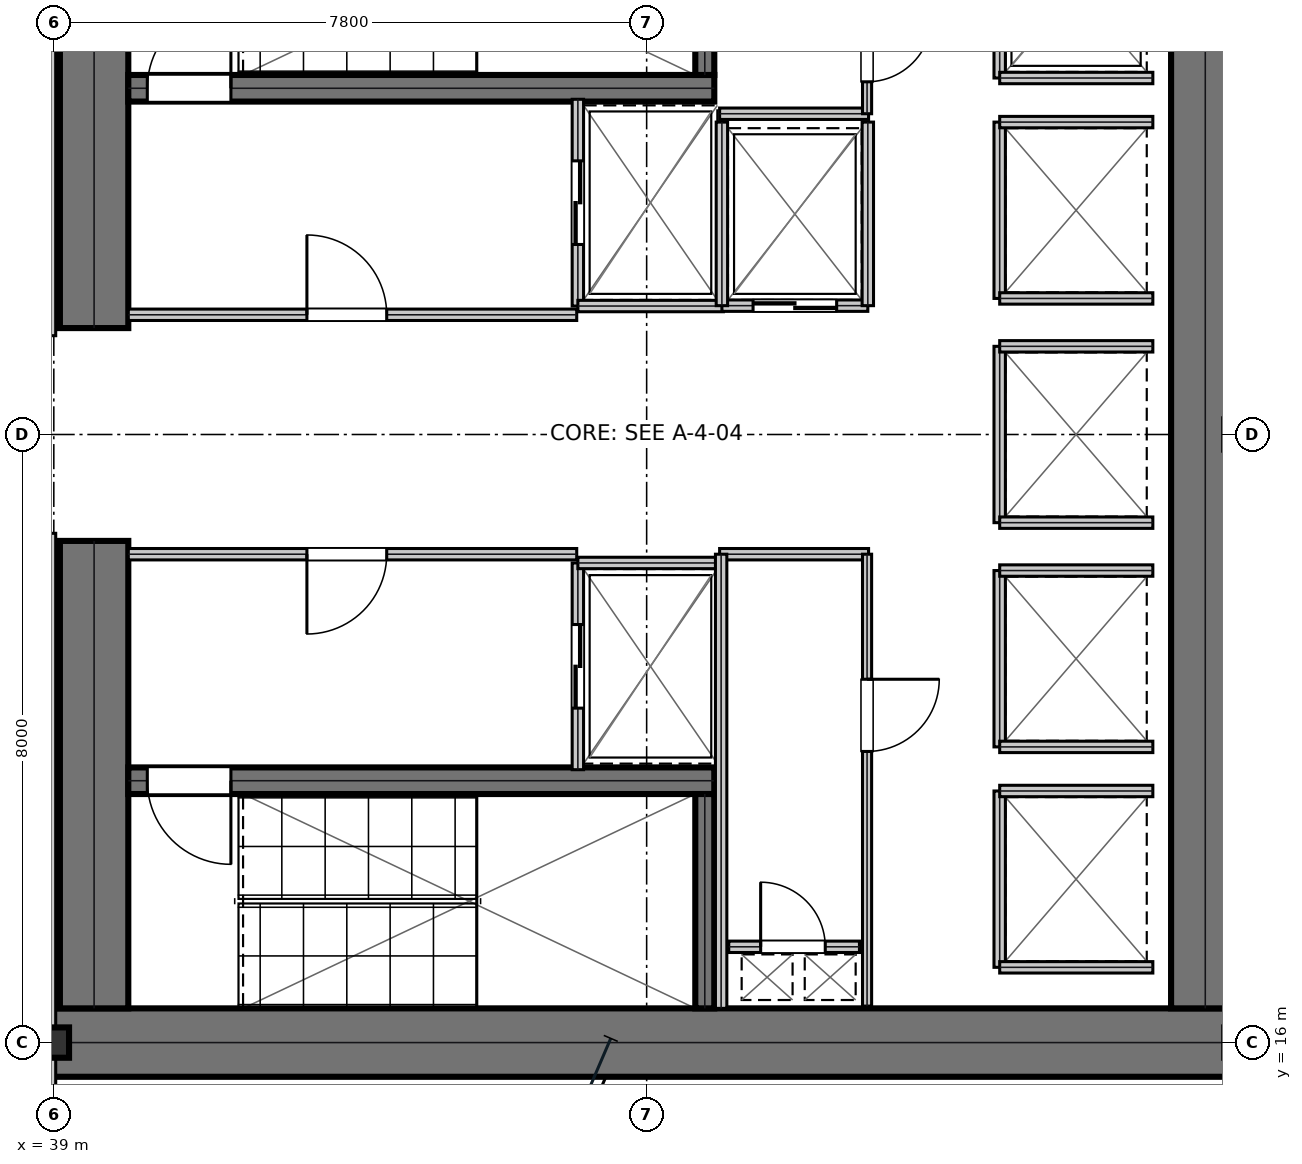
"""IFC4 building model, lengths in metres.
Left out: names, types, materials, properties, quantities, classifications, styles, units other than length and angle.
Written with IfcOpenShell. Run it as: python <this file> out.ifc"""

import sys

from ifc_helpers import new_model, si_unit, direction, frame, frame_2d, origin, origin_2d, place, context, subcontext, project, spatial, rectangle, i_section, extrude, element, fill, save


model = new_model("IFC4")
c1 = context("Model", 3, precision=1e-05, world=origin(), true_north=direction((0.0, 1.0)))
c2 = subcontext(c1, "Body", "Model", "MODEL_VIEW")
j1 = project(units=[si_unit("LENGTHUNIT", "METRE"), si_unit("PLANEANGLEUNIT", "RADIAN")], contexts=[c1])
p1 = place(None, origin())
s1 = spatial("IfcSite", under=j1, at=p1, CompositionType="ELEMENT")
p2 = place(p1, origin())
s2 = spatial("IfcBuilding", under=s1, at=p2, CompositionType="ELEMENT")
p3 = place(p2, frame((0.0, 0.0, 86.4)))
s3 = spatial("IfcBuildingStorey", under=s2, at=p3, CompositionType="ELEMENT", Elevation=86.4)
p4 = place(p3, frame((38.8, 16.0, 0.0), z_axis=(0.0, 0.0, 1.0), x_axis=(1.0, 0.0, 0.0)))
e1 = element("IfcWall", 1, at=p4, inside=s3, PredefinedType="SHEAR", context=c2, shape_type="SweptSolid", body=[
    extrude(rectangle(XDim=16.0, YDim=0.9, at=frame_2d((8.0, 0.0))), origin(), (0.0, 0.0, 1.0), 3.81),
])
for number, where, z_axis, x_axis in (
    (2, (39.53, 16.45, 0.0), (0.0, 0.0, 1.0), (0.0, 1.0, 0.0)),
    (3, (39.53, 25.4, 0.0), (0.0, 0.0, 1.0), (0.0, 1.0, 0.0)),
):
    element("IfcWall", number, at=place(p3, frame(where, z_axis=z_axis, x_axis=x_axis)), inside=s3, PredefinedType="SHEAR", context=c2, shape_type="SweptSolid", body=[
        extrude(rectangle(XDim=6.15, YDim=0.9, at=frame_2d((3.075, 0.0))), origin(), (0.0, 0.0, 1.0), 3.81),
    ])
p5 = place(p3, frame((54.15, 16.45, 0.0), z_axis=(0.0, 0.0, 1.0), x_axis=(0.0, 1.0, 0.0)))
e4 = element("IfcWall", 4, at=p5, inside=s3, PredefinedType="SHEAR", context=c2, shape_type="SweptSolid", body=[
    extrude(rectangle(XDim=15.1, YDim=0.9, at=frame_2d((7.55, 0.0))), origin(), (0.0, 0.0, 1.0), 3.81),
])
p6 = place(p3, frame((39.98, 28.555, 0.0), z_axis=(0.0, 0.0, 1.0), x_axis=(1.0, 0.0, 0.0)))
e5 = element("IfcWall", 5, at=p6, inside=s3, PredefinedType="SHEAR", context=c2, shape_type="SweptSolid", body=[
    extrude(rectangle(XDim=7.71, YDim=0.35, at=frame_2d((3.855, 0.0))), origin(), (0.0, 0.0, 1.0), 3.81),
])
p7 = place(p6, frame((0.25, 0.0, 0.0)))
e6 = element("IfcOpeningElement", 6, at=p7, cuts=e5, PredefinedType="OPENING", context=c2, shape_type="SweptSolid", body=[
    extrude(rectangle(XDim=1.1, YDim=2.15, at=frame_2d((0.55, 1.075))), frame((0.0, 0.185, 0.0), z_axis=(0.0, -1.0, 0.0), x_axis=(1.0, 0.0, 0.0)), (0.0, 0.0, 1.0), 0.37),
])
p8 = place(p3, frame((39.98, 19.445, 0.0), z_axis=(0.0, 0.0, 1.0), x_axis=(1.0, 0.0, 0.0)))
e7 = element("IfcWall", 7, at=p8, inside=s3, PredefinedType="SHEAR", context=c2, shape_type="SweptSolid", body=[
    extrude(rectangle(XDim=7.71, YDim=0.35, at=frame_2d((3.855, 0.0))), origin(), (0.0, 0.0, 1.0), 3.81),
])
p9 = place(p8, frame((0.25, 0.0, 0.0)))
e8 = element("IfcOpeningElement", 8, at=p9, cuts=e7, PredefinedType="OPENING", context=c2, shape_type="SweptSolid", body=[
    extrude(rectangle(XDim=1.1, YDim=2.15, at=frame_2d((0.55, 1.075))), frame((0.0, 0.185, 0.0), z_axis=(0.0, -1.0, 0.0), x_axis=(1.0, 0.0, 0.0)), (0.0, 0.0, 1.0), 0.37),
])
for number, where, z_axis, x_axis in (
    (9, (47.565, 28.73, 0.0), (0.0, 0.0, 1.0), (0.0, 1.0, 0.0)),
    (10, (47.565, 16.45, 0.0), (0.0, 0.0, 1.0), (0.0, 1.0, 0.0)),
):
    element("IfcWall", number, at=place(p3, frame(where, z_axis=z_axis, x_axis=x_axis)), inside=s3, PredefinedType="SHEAR", context=c2, shape_type="SweptSolid", body=[
        extrude(rectangle(XDim=2.82, YDim=0.25, at=frame_2d((1.41, 0.0))), origin(), (0.0, 0.0, 1.0), 3.81),
    ])
p10 = place(p3, frame((39.0, 16.0, 0.0), z_axis=(0.0, 0.0, 1.0), x_axis=(1.0, 0.0, 0.0)))
e11 = element("IfcColumn", 11, at=p10, inside=s3, PredefinedType="COLUMN", context=c2, shape_type="SweptSolid", body=[
    extrude(i_section(OverallWidth=0.401, OverallDepth=0.399, WebThickness=0.025, FlangeThickness=0.04, at=origin_2d()), origin(), (0.0, 0.0, 1.0), 4.044),
])
p11 = place(p3, frame((39.98, 25.575, 0.0), z_axis=(0.0, 0.0, 1.0), x_axis=(1.0, 0.0, 0.0)))
e12 = element("IfcWall", 12, at=p11, inside=s3, PredefinedType="PARTITIONING", context=c2, shape_type="SweptSolid", body=[
    extrude(rectangle(XDim=5.9, YDim=0.15, at=frame_2d((2.95, 0.0))), origin(), (0.0, 0.0, 1.0), 3.81),
])
p12 = place(p11, frame((2.35, 0.0, 0.0)))
e13 = element("IfcOpeningElement", 13, at=p12, cuts=e12, PredefinedType="OPENING", context=c2, shape_type="SweptSolid", body=[
    extrude(rectangle(XDim=1.05, YDim=2.15, at=frame_2d((0.525, 1.075))), frame((0.0, 0.085, 0.0), z_axis=(0.0, -1.0, 0.0), x_axis=(1.0, 0.0, 0.0)), (0.0, 0.0, 1.0), 0.17),
])
p13 = place(p3, frame((39.98, 22.425, 0.0), z_axis=(0.0, 0.0, 1.0), x_axis=(1.0, 0.0, 0.0)))
e14 = element("IfcWall", 14, at=p13, inside=s3, PredefinedType="PARTITIONING", context=c2, shape_type="SweptSolid", body=[
    extrude(rectangle(XDim=5.9, YDim=0.15, at=frame_2d((2.95, 0.0))), origin(), (0.0, 0.0, 1.0), 3.81),
])
p14 = place(p13, frame((2.35, 0.0, 0.0)))
e15 = element("IfcOpeningElement", 15, at=p14, cuts=e14, PredefinedType="OPENING", context=c2, shape_type="SweptSolid", body=[
    extrude(rectangle(XDim=1.05, YDim=2.15, at=frame_2d((0.525, 1.075))), frame((0.0, 0.085, 0.0), z_axis=(0.0, -1.0, 0.0), x_axis=(1.0, 0.0, 0.0)), (0.0, 0.0, 1.0), 0.17),
])
p15 = place(p3, frame((45.895, 25.69, 0.0), z_axis=(0.0, 0.0, 1.0), x_axis=(0.0, 1.0, 0.0)))
e16 = element("IfcWall", 16, at=p15, inside=s3, PredefinedType="PARTITIONING", context=c2, shape_type="SweptSolid", body=[
    extrude(rectangle(XDim=2.72, YDim=0.15, at=frame_2d((1.36, 0.0))), origin(), (0.0, 0.0, 1.0), 3.81),
])
p16 = place(p15, frame((0.81, 0.0, 0.0)))
e17 = element("IfcOpeningElement", 17, at=p16, cuts=e16, PredefinedType="OPENING", context=c2, shape_type="SweptSolid", body=[
    extrude(rectangle(XDim=1.1, YDim=2.15, at=frame_2d((0.55, 1.075))), frame((0.0, 0.085, 0.0), z_axis=(0.0, -1.0, 0.0), x_axis=(1.0, 0.0, 0.0)), (0.0, 0.0, 1.0), 0.17),
])
p17 = place(p3, frame((45.895, 25.69, 0.0), z_axis=(0.0, 0.0, 1.0), x_axis=(1.0, 0.0, 0.0)))
e18 = element("IfcWall", 18, at=p17, inside=s3, PredefinedType="PARTITIONING", context=c2, shape_type="SweptSolid", body=[
    extrude(rectangle(XDim=1.915, YDim=0.15, at=frame_2d((0.958, 0.0))), origin(), (0.0, 0.0, 1.0), 3.81),
])
p18 = place(p3, frame((45.895, 19.59, 0.0), z_axis=(0.0, 0.0, 1.0), x_axis=(0.0, 1.0, 0.0)))
e19 = element("IfcWall", 19, at=p18, inside=s3, PredefinedType="PARTITIONING", context=c2, shape_type="SweptSolid", body=[
    extrude(rectangle(XDim=2.72, YDim=0.15, at=frame_2d((1.36, 0.0))), origin(), (0.0, 0.0, 1.0), 3.81),
])
p19 = place(p18, frame((0.81, 0.0, 0.0)))
e20 = element("IfcOpeningElement", 20, at=p19, cuts=e19, PredefinedType="OPENING", context=c2, shape_type="SweptSolid", body=[
    extrude(rectangle(XDim=1.1, YDim=2.15, at=frame_2d((0.55, 1.075))), frame((0.0, 0.085, 0.0), z_axis=(0.0, -1.0, 0.0), x_axis=(1.0, 0.0, 0.0)), (0.0, 0.0, 1.0), 0.17),
])
p20 = place(p3, frame((45.895, 22.31, 0.0), z_axis=(0.0, 0.0, 1.0), x_axis=(1.0, 0.0, 0.0)))
e21 = element("IfcWall", 21, at=p20, inside=s3, PredefinedType="PARTITIONING", context=c2, shape_type="SweptSolid", body=[
    extrude(rectangle(XDim=1.915, YDim=0.15, at=frame_2d((0.958, 0.0))), origin(), (0.0, 0.0, 1.0), 3.81),
])
p21 = place(p3, frame((47.79, 25.695, 0.0), z_axis=(0.0, 0.0, 1.0), x_axis=(1.0, 0.0, 0.0)))
e22 = element("IfcWall", 22, at=p21, inside=s3, PredefinedType="PARTITIONING", context=c2, shape_type="SweptSolid", body=[
    extrude(rectangle(XDim=1.92, YDim=0.15, at=frame_2d((0.96, 0.0))), origin(), (0.0, 0.0, 1.0), 3.81),
])
p22 = place(p21, frame((0.41, 0.0, 0.0)))
e23 = element("IfcOpeningElement", 23, at=p22, cuts=e22, PredefinedType="OPENING", context=c2, shape_type="SweptSolid", body=[
    extrude(rectangle(XDim=1.1, YDim=2.15, at=frame_2d((0.55, 1.075))), frame((0.0, 0.085, 0.0), z_axis=(0.0, -1.0, 0.0), x_axis=(1.0, 0.0, 0.0)), (0.0, 0.0, 1.0), 0.17),
])
for number, where, z_axis, x_axis in (
    (24, (47.79, 25.695, 0.0), (0.0, 0.0, 1.0), (0.0, 1.0, 0.0)),
    (25, (49.71, 25.695, 0.0), (0.0, 0.0, 1.0), (0.0, 1.0, 0.0)),
):
    element("IfcWall", number, at=place(p3, frame(where, z_axis=z_axis, x_axis=x_axis)), inside=s3, PredefinedType="PARTITIONING", context=c2, shape_type="SweptSolid", body=[
        extrude(rectangle(XDim=2.415, YDim=0.15, at=frame_2d((1.208, 0.0))), origin(), (0.0, 0.0, 1.0), 3.81),
    ])
p23 = place(p3, frame((51.445, 28.69, 0.0), z_axis=(0.0, 0.0, 1.0), x_axis=(0.0, 1.0, 0.0)))
e26 = element("IfcWall", 26, at=p23, inside=s3, PredefinedType="PARTITIONING", context=c2, shape_type="SweptSolid", body=[
    extrude(rectangle(XDim=2.32, YDim=0.15, at=frame_2d((1.16, 0.0))), origin(), (0.0, 0.0, 1.0), 3.81),
])
p24 = place(p23, frame((0.61, 0.0, 0.0)))
e27 = element("IfcOpeningElement", 27, at=p24, cuts=e26, PredefinedType="OPENING", context=c2, shape_type="SweptSolid", body=[
    extrude(rectangle(XDim=1.1, YDim=2.15, at=frame_2d((0.55, 1.075))), frame((0.0, 0.085, 0.0), z_axis=(0.0, -1.0, 0.0), x_axis=(1.0, 0.0, 0.0)), (0.0, 0.0, 1.0), 0.17),
])
p25 = place(p3, frame((51.445, 28.69, 0.0), z_axis=(0.0, 0.0, 1.0), x_axis=(1.0, 0.0, 0.0)))
e28 = element("IfcWall", 28, at=p25, inside=s3, PredefinedType="PARTITIONING", context=c2, shape_type="SweptSolid", body=[
    extrude(rectangle(XDim=2.015, YDim=0.15, at=frame_2d((1.007, 0.0))), origin(), (0.0, 0.0, 1.0), 3.81),
])
p26 = place(p3, frame((51.445, 25.79, 0.0), z_axis=(0.0, 0.0, 1.0), x_axis=(0.0, 1.0, 0.0)))
e29 = element("IfcWall", 29, at=p26, inside=s3, PredefinedType="PARTITIONING", context=c2, shape_type="SweptSolid", body=[
    extrude(rectangle(XDim=2.32, YDim=0.15, at=frame_2d((1.16, 0.0))), origin(), (0.0, 0.0, 1.0), 3.81),
])
for number, where, z_axis, x_axis in (
    (30, (51.445, 25.79, 0.0), (0.0, 0.0, 1.0), (1.0, 0.0, 0.0)),
    (31, (51.445, 28.11, 0.0), (0.0, 0.0, 1.0), (1.0, 0.0, 0.0)),
):
    element("IfcWall", number, at=place(p3, frame(where, z_axis=z_axis, x_axis=x_axis)), inside=s3, PredefinedType="PARTITIONING", context=c2, shape_type="SweptSolid", body=[
        extrude(rectangle(XDim=2.015, YDim=0.15, at=frame_2d((1.007, 0.0))), origin(), (0.0, 0.0, 1.0), 3.81),
    ])
p27 = place(p3, frame((51.445, 19.89, 0.0), z_axis=(0.0, 0.0, 1.0), x_axis=(0.0, 1.0, 0.0)))
e32 = element("IfcWall", 32, at=p27, inside=s3, PredefinedType="PARTITIONING", context=c2, shape_type="SweptSolid", body=[
    extrude(rectangle(XDim=2.32, YDim=0.15, at=frame_2d((1.16, 0.0))), origin(), (0.0, 0.0, 1.0), 3.81),
])
for number, where, z_axis, x_axis in (
    (33, (51.445, 19.89, 0.0), (0.0, 0.0, 1.0), (1.0, 0.0, 0.0)),
    (34, (51.445, 22.21, 0.0), (0.0, 0.0, 1.0), (1.0, 0.0, 0.0)),
):
    element("IfcWall", number, at=place(p3, frame(where, z_axis=z_axis, x_axis=x_axis)), inside=s3, PredefinedType="PARTITIONING", context=c2, shape_type="SweptSolid", body=[
        extrude(rectangle(XDim=2.015, YDim=0.15, at=frame_2d((1.007, 0.0))), origin(), (0.0, 0.0, 1.0), 3.81),
    ])
p28 = place(p3, frame((51.445, 22.84, 0.0), z_axis=(0.0, 0.0, 1.0), x_axis=(0.0, 1.0, 0.0)))
e35 = element("IfcWall", 35, at=p28, inside=s3, PredefinedType="PARTITIONING", context=c2, shape_type="SweptSolid", body=[
    extrude(rectangle(XDim=2.32, YDim=0.15, at=frame_2d((1.16, 0.0))), origin(), (0.0, 0.0, 1.0), 3.81),
])
for number, where, z_axis, x_axis in (
    (36, (51.445, 22.84, 0.0), (0.0, 0.0, 1.0), (1.0, 0.0, 0.0)),
    (37, (51.445, 25.16, 0.0), (0.0, 0.0, 1.0), (1.0, 0.0, 0.0)),
):
    element("IfcWall", number, at=place(p3, frame(where, z_axis=z_axis, x_axis=x_axis)), inside=s3, PredefinedType="PARTITIONING", context=c2, shape_type="SweptSolid", body=[
        extrude(rectangle(XDim=2.015, YDim=0.15, at=frame_2d((1.007, 0.0))), origin(), (0.0, 0.0, 1.0), 3.81),
    ])
p29 = place(p3, frame((51.445, 16.99, 0.0), z_axis=(0.0, 0.0, 1.0), x_axis=(0.0, 1.0, 0.0)))
e38 = element("IfcWall", 38, at=p29, inside=s3, PredefinedType="PARTITIONING", context=c2, shape_type="SweptSolid", body=[
    extrude(rectangle(XDim=2.32, YDim=0.15, at=frame_2d((1.16, 0.0))), origin(), (0.0, 0.0, 1.0), 3.81),
])
for number, where, z_axis, x_axis in (
    (39, (51.445, 16.99, 0.0), (0.0, 0.0, 1.0), (1.0, 0.0, 0.0)),
    (40, (51.445, 19.31, 0.0), (0.0, 0.0, 1.0), (1.0, 0.0, 0.0)),
):
    element("IfcWall", number, at=place(p3, frame(where, z_axis=z_axis, x_axis=x_axis)), inside=s3, PredefinedType="PARTITIONING", context=c2, shape_type="SweptSolid", body=[
        extrude(rectangle(XDim=2.015, YDim=0.15, at=frame_2d((1.007, 0.0))), origin(), (0.0, 0.0, 1.0), 3.81),
    ])
p30 = place(p3, frame((47.88, 17.26, 0.0), z_axis=(0.0, 0.0, 1.0), x_axis=(1.0, 0.0, 0.0)))
e41 = element("IfcWall", 41, at=p30, inside=s3, PredefinedType="PARTITIONING", context=c2, shape_type="SweptSolid", body=[
    extrude(rectangle(XDim=1.72, YDim=0.15, at=frame_2d((0.86, 0.0))), origin(), (0.0, 0.0, 1.0), 3.81),
])
p31 = place(p30, frame((0.42, 0.0, 0.0)))
e42 = element("IfcOpeningElement", 42, at=p31, cuts=e41, PredefinedType="OPENING", context=c2, shape_type="SweptSolid", body=[
    extrude(rectangle(XDim=0.85, YDim=2.15, at=frame_2d((0.425, 1.075))), frame((0.0, 0.085, 0.0), z_axis=(0.0, -1.0, 0.0), x_axis=(1.0, 0.0, 0.0)), (0.0, 0.0, 1.0), 0.17),
])
p32 = place(p3, frame((47.76, 22.425, 0.0), z_axis=(0.0, 0.0, 1.0), x_axis=(1.0, 0.0, 0.0)))
e43 = element("IfcWall", 43, at=p32, inside=s3, PredefinedType="PARTITIONING", context=c2, shape_type="SweptSolid", body=[
    extrude(rectangle(XDim=1.96, YDim=0.15, at=frame_2d((0.98, 0.0))), origin(), (0.0, 0.0, 1.0), 3.81),
])
p33 = place(p3, frame((47.78, 16.45, 0.0), z_axis=(0.0, 0.0, 1.0), x_axis=(0.0, 1.0, 0.0)))
e44 = element("IfcWall", 44, at=p33, inside=s3, PredefinedType="PARTITIONING", context=c2, shape_type="SweptSolid", body=[
    extrude(rectangle(XDim=5.975, YDim=0.15, at=frame_2d((2.988, 0.0))), origin(), (0.0, 0.0, 1.0), 3.81),
])
p34 = place(p3, frame((49.7, 16.48, 0.0), z_axis=(0.0, 0.0, 1.0), x_axis=(0.0, 1.0, 0.0)))
e45 = element("IfcWall", 45, at=p34, inside=s3, PredefinedType="PARTITIONING", context=c2, shape_type="SweptSolid", body=[
    extrude(rectangle(XDim=5.945, YDim=0.12, at=frame_2d((2.973, 0.0))), origin(), (0.0, 0.0, 1.0), 3.81),
])
p35 = place(p34, frame((3.35, 0.0, 0.0)))
e46 = element("IfcOpeningElement", 46, at=p35, cuts=e45, PredefinedType="OPENING", context=c2, shape_type="SweptSolid", body=[
    extrude(rectangle(XDim=0.95, YDim=2.15, at=frame_2d((0.475, 1.075))), frame((0.0, 0.07, 0.0), z_axis=(0.0, -1.0, 0.0), x_axis=(1.0, 0.0, 0.0)), (0.0, 0.0, 1.0), 0.14),
])
p36 = place(p3, frame((47.76, 28.22, 0.0), z_axis=(0.0, 0.0, 1.0), x_axis=(1.0, 0.0, 0.0)))
e47 = element("IfcWall", 47, at=p36, inside=s3, PredefinedType="PARTITIONING", context=c2, shape_type="SweptSolid", body=[
    extrude(rectangle(XDim=1.96, YDim=0.15, at=frame_2d((0.98, 0.0))), origin(), (0.0, 0.0, 1.0), 3.81),
])
p37 = place(p3, frame((49.7, 28.22, 0.0), z_axis=(0.0, 0.0, 1.0), x_axis=(0.0, 1.0, 0.0)))
e48 = element("IfcWall", 48, at=p37, inside=s3, PredefinedType="PARTITIONING", context=c2, shape_type="SweptSolid", body=[
    extrude(rectangle(XDim=3.3, YDim=0.12, at=frame_2d((1.65, 0.0))), origin(), (0.0, 0.0, 1.0), 3.81),
])
p38 = place(p37, frame((0.42, 0.0, 0.0)))
e49 = element("IfcOpeningElement", 49, at=p38, cuts=e48, PredefinedType="OPENING", context=c2, shape_type="SweptSolid", body=[
    extrude(rectangle(XDim=0.85, YDim=2.15, at=frame_2d((0.425, 1.075))), frame((0.0, 0.07, 0.0), z_axis=(0.0, -1.0, 0.0), x_axis=(1.0, 0.0, 0.0)), (0.0, 0.0, 1.0), 0.14),
])
p39 = place(p37, frame((1.98, 0.0, 0.0)))
e50 = element("IfcOpeningElement", 50, at=p39, cuts=e48, PredefinedType="OPENING", context=c2, shape_type="SweptSolid", body=[
    extrude(rectangle(XDim=0.85, YDim=2.15, at=frame_2d((0.425, 1.075))), frame((0.0, 0.07, 0.0), z_axis=(0.0, -1.0, 0.0), x_axis=(1.0, 0.0, 0.0)), (0.0, 0.0, 1.0), 0.14),
])
for number, where, z_axis, x_axis in (
    (51, (38.95, 14.5, 0.0), (0.0, 0.0, 1.0), (0.0, 1.0, 0.0)),
    (52, (38.95, 25.3, 0.0), (0.0, 0.0, 1.0), (0.0, 1.0, 0.0)),
):
    element("IfcWall", number, at=place(p3, frame(where, z_axis=z_axis, x_axis=x_axis)), inside=s3, PredefinedType="PARTITIONING", context=c2, shape_type="SweptSolid", body=[
        extrude(rectangle(XDim=8.2, YDim=0.15, at=frame_2d((4.1, 0.0))), origin(), (0.0, 0.0, 1.0), 3.181),
    ])
p40 = place(p12, origin())
e53 = element("IfcDoor", 53, at=p40, inside=s3, OperationType="SINGLE_SWING_LEFT", PredefinedType="DOOR", context=c2, shape_type="SweptSolid", body=[
    extrude(rectangle(XDim=1.05, YDim=2.15, at=frame_2d((0.525, 1.075))), frame((0.0, 0.025, 0.0), z_axis=(0.0, -1.0, 0.0), x_axis=(1.0, 0.0, 0.0)), (0.0, 0.0, 1.0), 0.05),
])
fill(e13, e53)
p41 = place(p14, frame((1.05, 0.0, 0.0), z_axis=(0.0, 0.0, 1.0), x_axis=(-1.0, 0.0, 0.0)))
e54 = element("IfcDoor", 54, at=p41, inside=s3, OperationType="SINGLE_SWING_RIGHT", PredefinedType="DOOR", context=c2, shape_type="SweptSolid", body=[
    extrude(rectangle(XDim=1.05, YDim=2.15, at=frame_2d((0.525, 1.075))), frame((0.0, 0.025, 0.0), z_axis=(0.0, -1.0, 0.0), x_axis=(1.0, 0.0, 0.0)), (0.0, 0.0, 1.0), 0.05),
])
fill(e15, e54)
p42 = place(p16, frame((1.1, 0.0, 0.0), z_axis=(0.0, 0.0, 1.0), x_axis=(-1.0, 0.0, 0.0)))
e55 = element("IfcDoor", 55, at=p42, inside=s3, OperationType="DOUBLE_DOOR_SLIDING", PredefinedType="DOOR", context=c2, shape_type="SweptSolid", body=[
    extrude(rectangle(XDim=1.1, YDim=2.15, at=frame_2d((0.55, 1.075))), frame((0.0, 0.025, 0.0), z_axis=(0.0, -1.0, 0.0), x_axis=(1.0, 0.0, 0.0)), (0.0, 0.0, 1.0), 0.05),
])
fill(e17, e55)
p43 = place(p19, frame((1.1, 0.0, 0.0), z_axis=(0.0, 0.0, 1.0), x_axis=(-1.0, 0.0, 0.0)))
e56 = element("IfcDoor", 56, at=p43, inside=s3, OperationType="DOUBLE_DOOR_SLIDING", PredefinedType="DOOR", context=c2, shape_type="SweptSolid", body=[
    extrude(rectangle(XDim=1.1, YDim=2.15, at=frame_2d((0.55, 1.075))), frame((0.0, 0.025, 0.0), z_axis=(0.0, -1.0, 0.0), x_axis=(1.0, 0.0, 0.0)), (0.0, 0.0, 1.0), 0.05),
])
fill(e20, e56)
p44 = place(p22, frame((1.1, 0.0, 0.0), z_axis=(0.0, 0.0, 1.0), x_axis=(-1.0, 0.0, 0.0)))
e57 = element("IfcDoor", 57, at=p44, inside=s3, OperationType="DOUBLE_DOOR_SLIDING", PredefinedType="DOOR", context=c2, shape_type="SweptSolid", body=[
    extrude(rectangle(XDim=1.1, YDim=2.15, at=frame_2d((0.55, 1.075))), frame((0.0, 0.025, 0.0), z_axis=(0.0, -1.0, 0.0), x_axis=(1.0, 0.0, 0.0)), (0.0, 0.0, 1.0), 0.05),
])
fill(e23, e57)
p45 = place(p31, origin())
e58 = element("IfcDoor", 58, at=p45, inside=s3, OperationType="SINGLE_SWING_LEFT", PredefinedType="TRAPDOOR", context=c2, shape_type="SweptSolid", body=[
    extrude(rectangle(XDim=0.85, YDim=2.15, at=frame_2d((0.425, 1.075))), frame((0.0, 0.025, 0.0), z_axis=(0.0, -1.0, 0.0), x_axis=(1.0, 0.0, 0.0)), (0.0, 0.0, 1.0), 0.05),
])
fill(e42, e58)
p46 = place(p35, frame((0.95, 0.0, 0.0), z_axis=(0.0, 0.0, 1.0), x_axis=(-1.0, 0.0, 0.0)))
e59 = element("IfcDoor", 59, at=p46, inside=s3, OperationType="SINGLE_SWING_LEFT", PredefinedType="DOOR", context=c2, shape_type="SweptSolid", body=[
    extrude(rectangle(XDim=0.95, YDim=2.15, at=frame_2d((0.475, 1.075))), frame((0.0, 0.025, 0.0), z_axis=(0.0, -1.0, 0.0), x_axis=(1.0, 0.0, 0.0)), (0.0, 0.0, 1.0), 0.05),
])
fill(e46, e59)
p47 = place(p38, frame((0.85, 0.0, 0.0), z_axis=(0.0, 0.0, 1.0), x_axis=(-1.0, 0.0, 0.0)))
e60 = element("IfcDoor", 60, at=p47, inside=s3, OperationType="SINGLE_SWING_LEFT", PredefinedType="DOOR", context=c2, shape_type="SweptSolid", body=[
    extrude(rectangle(XDim=0.85, YDim=2.15, at=frame_2d((0.425, 1.075))), frame((0.0, 0.025, 0.0), z_axis=(0.0, -1.0, 0.0), x_axis=(1.0, 0.0, 0.0)), (0.0, 0.0, 1.0), 0.05),
])
fill(e49, e60)
p48 = place(p7, origin())
e61 = element("IfcDoor", 61, at=p48, inside=s3, OperationType="SINGLE_SWING_RIGHT", PredefinedType="DOOR", context=c2, shape_type="SweptSolid", body=[
    extrude(rectangle(XDim=1.1, YDim=2.15, at=frame_2d((0.55, 1.075))), frame((0.0, 0.025, 0.0), z_axis=(0.0, -1.0, 0.0), x_axis=(1.0, 0.0, 0.0)), (0.0, 0.0, 1.0), 0.05),
])
fill(e6, e61)
p49 = place(p9, frame((1.1, 0.0, 0.0), z_axis=(0.0, 0.0, 1.0), x_axis=(-1.0, 0.0, 0.0)))
e62 = element("IfcDoor", 62, at=p49, inside=s3, OperationType="SINGLE_SWING_LEFT", PredefinedType="DOOR", context=c2, shape_type="SweptSolid", body=[
    extrude(rectangle(XDim=1.1, YDim=2.15, at=frame_2d((0.55, 1.075))), frame((0.0, 0.025, 0.0), z_axis=(0.0, -1.0, 0.0), x_axis=(1.0, 0.0, 0.0)), (0.0, 0.0, 1.0), 0.05),
])
fill(e8, e62)
save(model, sys.argv[1])
